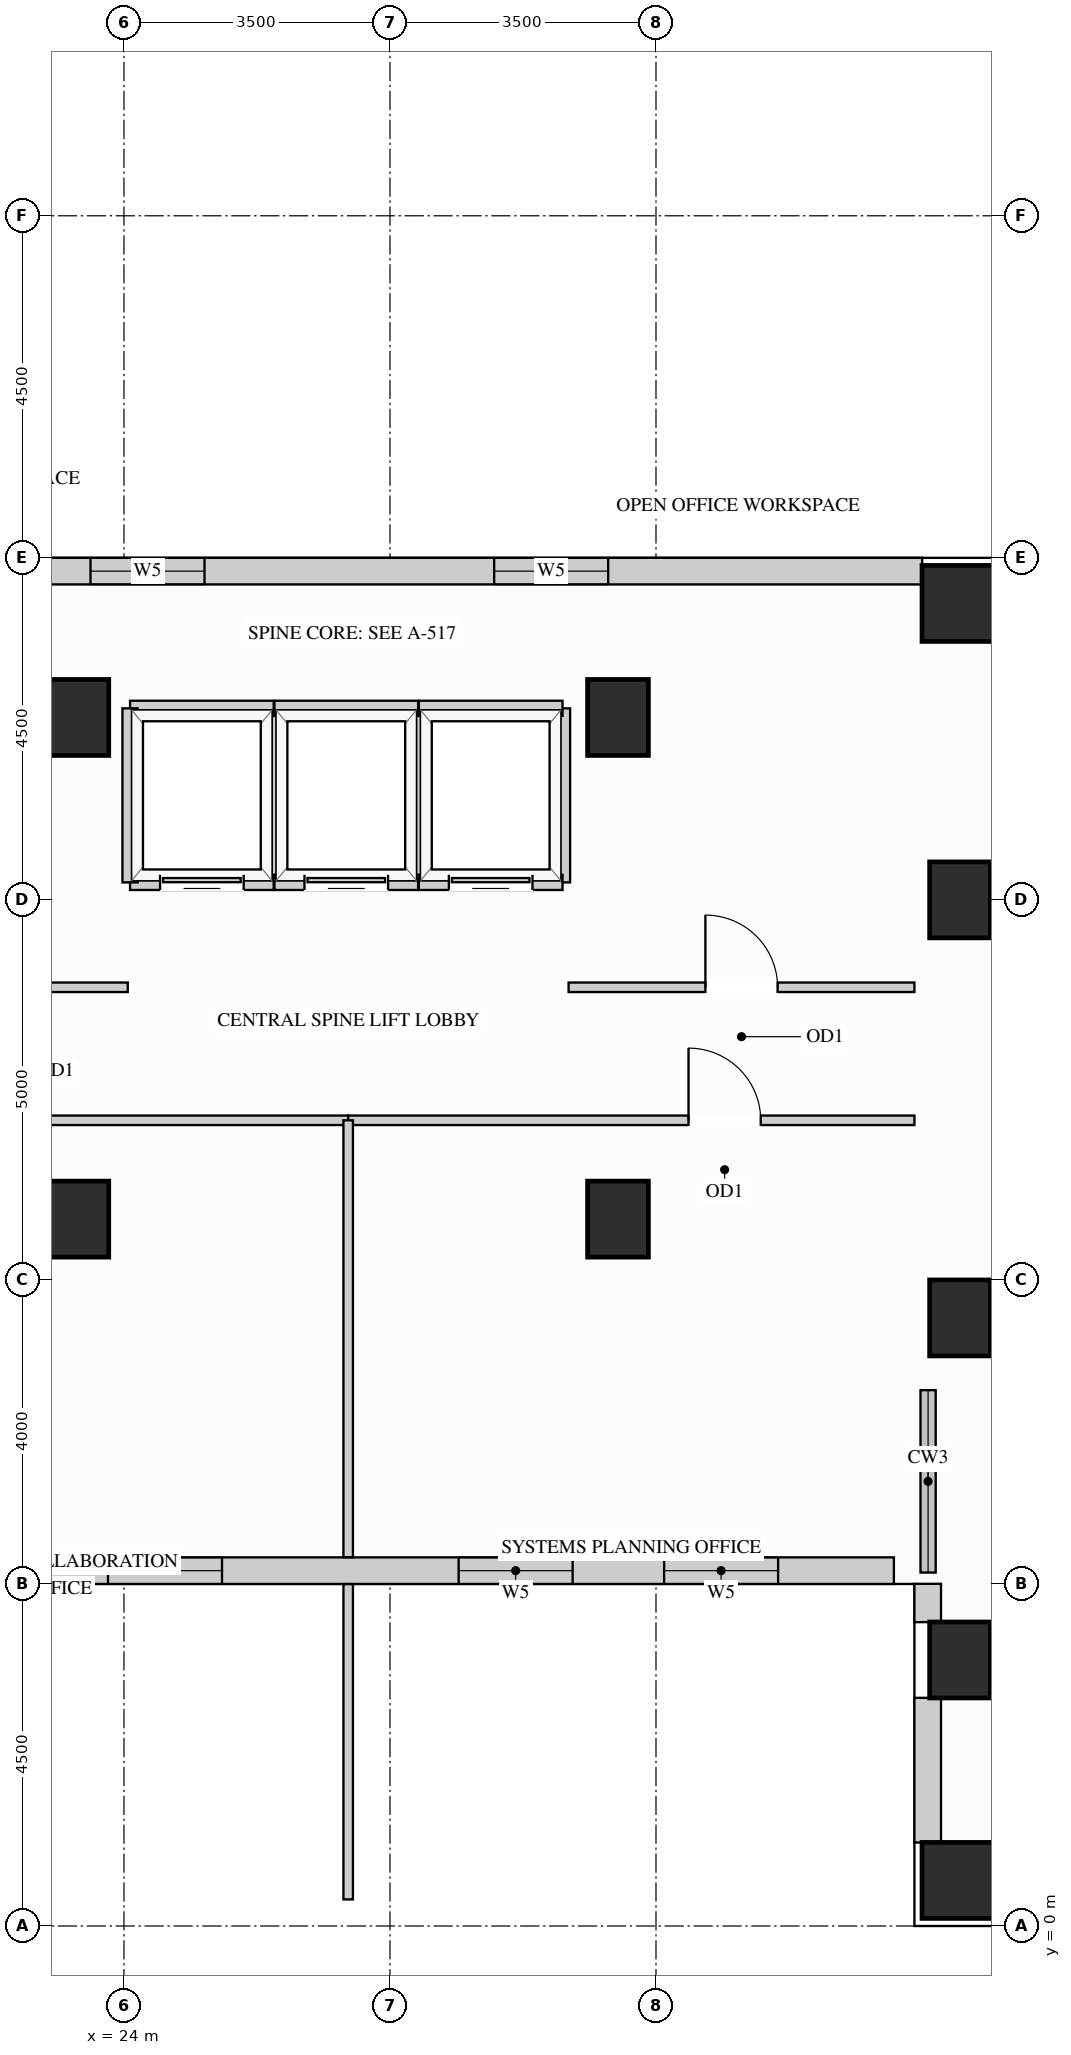
"""IFC4 building model, lengths in metres.
Left out: names, types, materials, properties, quantities, classifications, styles, units other than length and angle.
Written with IfcOpenShell. Run it as: python <this file> out.ifc"""

import sys

from ifc_helpers import new_model, si_unit, direction, frame, frame_2d, origin, origin_2d, place, context, subcontext, project, spatial, rectangle, extrude, source, transform, mapped, element, fill, save


model = new_model("IFC4")
c1 = context("Model", 3, precision=1e-05, world=origin(), true_north=direction((0.0, 1.0)))
c2 = subcontext(c1, "Body", "Model", "MODEL_VIEW")
j1 = project(units=[si_unit("LENGTHUNIT", "METRE"), si_unit("PLANEANGLEUNIT", "RADIAN")], contexts=[c1])
p1 = place(None, origin())
s1 = spatial("IfcSite", under=j1, at=p1, CompositionType="ELEMENT")
p2 = place(p1, origin())
s2 = spatial("IfcBuilding", under=s1, at=p2, CompositionType="ELEMENT")
p3 = place(p2, frame((0.0, 0.0, 146.7)))
s3 = spatial("IfcBuildingStorey", under=s2, at=p3, CompositionType="ELEMENT", Elevation=146.7)
m1 = source(origin(), c2, "Body", "SweptSolid", [
    extrude(rectangle(XDim=0.8, YDim=1.0, at=origin_2d()), origin(), (0.0, 0.0, 1.0), 3.4),
])
for number, where, z_axis, x_axis in (
    (1, (35.0, 13.5, 0.0), (0.0, 0.0, 1.0), (1.0, 0.0, 0.0)),
    (2, (35.0, 3.5, 0.0), (0.0, 0.0, 1.0), (1.0, 0.0, 0.0)),
    (3, (35.0, 8.0, 0.0), (0.0, 0.0, 1.0), (1.0, 0.0, 0.0)),
    (4, (23.4, 15.9, 0.0), (0.0, 0.0, 1.0), (1.0, 0.0, 0.0)),
    (5, (23.4, 9.3, 0.0), (0.0, 0.0, 1.0), (1.0, 0.0, 0.0)),
    (6, (30.5, 15.9, 0.0), (0.0, 0.0, 1.0), (1.0, 0.0, 0.0)),
    (7, (30.5, 9.3, 0.0), (0.0, 0.0, 1.0), (1.0, 0.0, 0.0)),
):
    element("IfcColumn", number, at=place(p3, frame(where, z_axis=z_axis, x_axis=x_axis)), inside=s3, PredefinedType="COLUMN", context=c2, shape_type="MappedRepresentation", body=[
        mapped(m1, transform((0.0, 0.0, 0.0), x_axis=(1.0, 0.0, 0.0), y_axis=(0.0, 1.0, 0.0), z_axis=(0.0, 0.0, 1.0))),
    ])
m2 = source(origin(), c2, "Body", "SweptSolid", [
    extrude(rectangle(XDim=1.0, YDim=1.0, at=origin_2d()), origin(), (0.0, 0.0, 1.0), 3.4),
])
for number, where, z_axis, x_axis in (
    (8, (35.0, 17.4, 0.0), (0.0, 0.0, 1.0), (1.0, 0.0, 0.0)),
    (9, (35.0, 0.6, 0.0), (0.0, 0.0, 1.0), (1.0, 0.0, 0.0)),
):
    element("IfcColumn", number, at=place(p3, frame(where, z_axis=z_axis, x_axis=x_axis)), inside=s3, PredefinedType="COLUMN", context=c2, shape_type="MappedRepresentation", body=[
        mapped(m2, transform((0.0, 0.0, 0.0), x_axis=(1.0, 0.0, 0.0), y_axis=(0.0, 1.0, 0.0), z_axis=(0.0, 0.0, 1.0))),
    ])
p4 = place(p3, frame((19.15, 4.675, 0.0), z_axis=(0.0, 0.0, 1.0), x_axis=(1.0, 0.0, 0.0)))
e10 = element("IfcWall", 10, at=p4, inside=s3, PredefinedType="SOLIDWALL", context=c2, shape_type="SweptSolid", body=[
    extrude(rectangle(XDim=14.98, YDim=0.35, at=frame_2d((7.49, 0.0))), origin(), (0.0, 0.0, 1.0), 3.385),
])
p5 = place(p4, frame((1.73, 0.0, 0.78)))
e11 = element("IfcOpeningElement", 11, at=p5, cuts=e10, PredefinedType="OPENING", context=c2, shape_type="SweptSolid", body=[
    extrude(rectangle(XDim=1.5, YDim=2.0, at=frame_2d((0.75, 1.0))), frame((0.0, 0.185, 0.0), z_axis=(0.0, -1.0, 0.0), x_axis=(1.0, 0.0, 0.0)), (0.0, 0.0, 1.0), 0.37),
])
p6 = place(p4, frame((4.64, 0.0, 0.78)))
e12 = element("IfcOpeningElement", 12, at=p6, cuts=e10, PredefinedType="OPENING", context=c2, shape_type="SweptSolid", body=[
    extrude(rectangle(XDim=1.5, YDim=2.0, at=frame_2d((0.75, 1.0))), frame((0.0, 0.185, 0.0), z_axis=(0.0, -1.0, 0.0), x_axis=(1.0, 0.0, 0.0)), (0.0, 0.0, 1.0), 0.37),
])
p7 = place(p4, frame((9.253, 0.0, 0.78)))
e13 = element("IfcOpeningElement", 13, at=p7, cuts=e10, PredefinedType="OPENING", context=c2, shape_type="SweptSolid", body=[
    extrude(rectangle(XDim=1.5, YDim=2.0, at=frame_2d((0.75, 1.0))), frame((0.0, 0.185, 0.0), z_axis=(0.0, -1.0, 0.0), x_axis=(1.0, 0.0, 0.0)), (0.0, 0.0, 1.0), 0.37),
])
p8 = place(p4, frame((11.957, 0.0, 0.78)))
e14 = element("IfcOpeningElement", 14, at=p8, cuts=e10, PredefinedType="OPENING", context=c2, shape_type="SweptSolid", body=[
    extrude(rectangle(XDim=1.5, YDim=2.0, at=frame_2d((0.75, 1.0))), frame((0.0, 0.185, 0.0), z_axis=(0.0, -1.0, 0.0), x_axis=(1.0, 0.0, 0.0)), (0.0, 0.0, 1.0), 0.37),
])
m3 = source(origin(), c2, "Body", "SweptSolid", [
    extrude(rectangle(XDim=0.504, YDim=0.35, at=frame_2d((0.252, 0.0))), origin(), (0.0, 0.0, 1.0), 3.385),
])
p9 = place(p3, frame((34.575, 4.502, 0.0), z_axis=(0.0, 0.0, 1.0), x_axis=(0.0, -1.0, 0.0)))
e15 = element("IfcWall", 15, at=p9, inside=s3, PredefinedType="SOLIDWALL", context=c2, shape_type="MappedRepresentation", body=[
    mapped(m3, transform((0.0, 0.0, 0.0), x_axis=(1.0, 0.0, 0.0), y_axis=(0.0, 1.0, 0.0), z_axis=(0.0, 0.0, 1.0))),
])
m4 = source(origin(), c2, "Body", "SweptSolid", [
    extrude(rectangle(XDim=1.904, YDim=0.35, at=frame_2d((0.952, 0.0))), origin(), (0.0, 0.0, 1.0), 2.612),
])
p10 = place(p3, frame((34.575, 3.002, 0.0), z_axis=(0.0, 0.0, 1.0), x_axis=(0.0, -1.0, 0.0)))
e16 = element("IfcWall", 16, at=p10, inside=s3, PredefinedType="SOLIDWALL", context=c2, shape_type="MappedRepresentation", body=[
    mapped(m4, transform((0.0, 0.0, 0.0), x_axis=(1.0, 0.0, 0.0), y_axis=(0.0, 1.0, 0.0), z_axis=(0.0, 0.0, 1.0))),
])
p11 = place(p3, frame((34.502, 17.825, 0.0), z_axis=(0.0, 0.0, 1.0), x_axis=(-1.0, 0.0, 0.0)))
e17 = element("IfcWall", 17, at=p11, inside=s3, PredefinedType="SOLIDWALL", context=c2, shape_type="SweptSolid", body=[
    extrude(rectangle(XDim=15.104, YDim=0.35, at=frame_2d((7.552, 0.0))), origin(), (0.0, 0.0, 1.0), 3.385),
])
p12 = place(p11, frame((4.131, 0.0, 0.78)))
e18 = element("IfcOpeningElement", 18, at=p12, cuts=e17, PredefinedType="OPENING", context=c2, shape_type="SweptSolid", body=[
    extrude(rectangle(XDim=1.5, YDim=2.0, at=frame_2d((0.75, 1.0))), frame((0.0, 0.185, 0.0), z_axis=(0.0, -1.0, 0.0), x_axis=(1.0, 0.0, 0.0)), (0.0, 0.0, 1.0), 0.37),
])
p13 = place(p11, frame((9.442, 0.0, 0.78)))
e19 = element("IfcOpeningElement", 19, at=p13, cuts=e17, PredefinedType="OPENING", context=c2, shape_type="SweptSolid", body=[
    extrude(rectangle(XDim=1.5, YDim=2.0, at=frame_2d((0.75, 1.0))), frame((0.0, 0.185, 0.0), z_axis=(0.0, -1.0, 0.0), x_axis=(1.0, 0.0, 0.0)), (0.0, 0.0, 1.0), 0.37),
])
p14 = place(p3, frame((29.85, 12.35, 0.0), z_axis=(0.0, 0.0, 1.0), x_axis=(1.0, 0.0, 0.0)))
e20 = element("IfcWall", 20, at=p14, inside=s3, PredefinedType="PARTITIONING", context=c2, shape_type="SweptSolid", body=[
    extrude(rectangle(XDim=4.55, YDim=0.125, at=frame_2d((2.275, 0.0))), origin(), (0.0, 0.0, 1.0), 3.385),
])
p15 = place(p14, frame((1.8, 0.0, 0.0)))
e21 = element("IfcOpeningElement", 21, at=p15, cuts=e20, PredefinedType="OPENING", context=c2, shape_type="SweptSolid", body=[
    extrude(rectangle(XDim=0.95, YDim=2.15, at=frame_2d((0.475, 1.075))), frame((0.0, 0.073, 0.0), z_axis=(0.0, -1.0, 0.0), x_axis=(1.0, 0.0, 0.0)), (0.0, 0.0, 1.0), 0.145),
])
p16 = place(p3, frame((19.5, 12.35, 0.0), z_axis=(0.0, 0.0, 1.0), x_axis=(1.0, 0.0, 0.0)))
e22 = element("IfcWall", 22, at=p16, inside=s3, PredefinedType="PARTITIONING", context=c2, shape_type="SweptSolid", body=[
    extrude(rectangle(XDim=4.55, YDim=0.125, at=frame_2d((2.275, 0.0))), origin(), (0.0, 0.0, 1.0), 3.385),
])
p17 = place(p16, frame((1.8, 0.0, 0.0)))
e23 = element("IfcOpeningElement", 23, at=p17, cuts=e22, PredefinedType="OPENING", context=c2, shape_type="SweptSolid", body=[
    extrude(rectangle(XDim=0.95, YDim=2.15, at=frame_2d((0.475, 1.075))), frame((0.0, 0.073, 0.0), z_axis=(0.0, -1.0, 0.0), x_axis=(1.0, 0.0, 0.0)), (0.0, 0.0, 1.0), 0.145),
])
p18 = place(p3, frame((19.5, 10.6, 0.0), z_axis=(0.0, 0.0, 1.0), x_axis=(1.0, 0.0, 0.0)))
e24 = element("IfcWall", 24, at=p18, inside=s3, PredefinedType="PARTITIONING", context=c2, shape_type="SweptSolid", body=[
    extrude(rectangle(XDim=7.45, YDim=0.125, at=frame_2d((3.725, 0.0))), origin(), (0.0, 0.0, 1.0), 3.385),
])
p19 = place(p18, frame((2.022, 0.0, 0.0)))
e25 = element("IfcOpeningElement", 25, at=p19, cuts=e24, PredefinedType="OPENING", context=c2, shape_type="SweptSolid", body=[
    extrude(rectangle(XDim=0.95, YDim=2.15, at=frame_2d((0.475, 1.075))), frame((0.0, 0.073, 0.0), z_axis=(0.0, -1.0, 0.0), x_axis=(1.0, 0.0, 0.0)), (0.0, 0.0, 1.0), 0.145),
])
p20 = place(p3, frame((26.95, 10.6, 0.0), z_axis=(0.0, 0.0, 1.0), x_axis=(1.0, 0.0, 0.0)))
e26 = element("IfcWall", 26, at=p20, inside=s3, PredefinedType="PARTITIONING", context=c2, shape_type="SweptSolid", body=[
    extrude(rectangle(XDim=7.45, YDim=0.125, at=frame_2d((3.725, 0.0))), origin(), (0.0, 0.0, 1.0), 3.385),
])
p21 = place(p20, frame((4.478, 0.0, 0.0)))
e27 = element("IfcOpeningElement", 27, at=p21, cuts=e26, PredefinedType="OPENING", context=c2, shape_type="SweptSolid", body=[
    extrude(rectangle(XDim=0.95, YDim=2.15, at=frame_2d((0.475, 1.075))), frame((0.0, 0.073, 0.0), z_axis=(0.0, -1.0, 0.0), x_axis=(1.0, 0.0, 0.0)), (0.0, 0.0, 1.0), 0.145),
])
m5 = source(origin(), c2, "Body", "SweptSolid", [
    extrude(rectangle(XDim=4.148, YDim=0.125, at=frame_2d((2.074, 0.0))), origin(), (0.0, 0.0, 1.0), 3.385),
])
p22 = place(p3, frame((26.95, 0.35, 0.0), z_axis=(0.0, 0.0, 1.0), x_axis=(0.0, 1.0, 0.0)))
e28 = element("IfcWall", 28, at=p22, inside=s3, PredefinedType="PARTITIONING", context=c2, shape_type="MappedRepresentation", body=[
    mapped(m5, transform((0.0, 0.0, 0.0), x_axis=(1.0, 0.0, 0.0), y_axis=(0.0, 1.0, 0.0), z_axis=(0.0, 0.0, 1.0))),
])
m6 = source(origin(), c2, "Body", "SweptSolid", [
    extrude(rectangle(XDim=5.748, YDim=0.125, at=frame_2d((2.874, 0.0))), origin(), (0.0, 0.0, 1.0), 3.385),
])
p23 = place(p3, frame((26.95, 4.852, 0.0), z_axis=(0.0, 0.0, 1.0), x_axis=(0.0, 1.0, 0.0)))
e29 = element("IfcWall", 29, at=p23, inside=s3, PredefinedType="PARTITIONING", context=c2, shape_type="MappedRepresentation", body=[
    mapped(m6, transform((0.0, 0.0, 0.0), x_axis=(1.0, 0.0, 0.0), y_axis=(0.0, 1.0, 0.0), z_axis=(0.0, 0.0, 1.0))),
])
m7 = source(origin(), c2, "Body", "SweptSolid", [
    extrude(rectangle(XDim=2.29, YDim=0.2, at=frame_2d((1.145, 0.0))), origin(), (0.0, 0.0, 1.0), 3.385),
])
p24 = place(p3, frame((25.97, 13.73, 0.0), z_axis=(0.0, 0.0, 1.0), x_axis=(0.0, 1.0, 0.0)))
e30 = element("IfcWall", 30, at=p24, inside=s3, PredefinedType="PARTITIONING", context=c2, shape_type="MappedRepresentation", body=[
    mapped(m7, transform((0.0, 0.0, 0.0), x_axis=(1.0, 0.0, 0.0), y_axis=(0.0, 1.0, 0.0), z_axis=(0.0, 0.0, 1.0))),
])
m8 = source(origin(), c2, "Body", "SweptSolid", [
    extrude(rectangle(XDim=1.89, YDim=0.2, at=frame_2d((0.945, 0.0))), origin(), (0.0, 0.0, 1.0), 2.773),
])
p25 = place(p3, frame((24.08, 16.02, 0.0), z_axis=(0.0, 0.0, 1.0), x_axis=(1.0, 0.0, 0.0)))
e31 = element("IfcWall", 31, at=p25, inside=s3, PredefinedType="PARTITIONING", context=c2, shape_type="MappedRepresentation", body=[
    mapped(m8, transform((0.0, 0.0, 0.0), x_axis=(1.0, 0.0, 0.0), y_axis=(0.0, 1.0, 0.0), z_axis=(0.0, 0.0, 1.0))),
])
p26 = place(p3, frame((24.08, 13.73, 0.0), z_axis=(0.0, 0.0, 1.0), x_axis=(1.0, 0.0, 0.0)))
e32 = element("IfcWall", 32, at=p26, inside=s3, PredefinedType="PARTITIONING", context=c2, shape_type="SweptSolid", body=[
    extrude(rectangle(XDim=1.89, YDim=0.2, at=frame_2d((0.945, 0.0))), origin(), (0.0, 0.0, 1.0), 2.466),
])
p27 = place(p26, frame((0.395, 0.0, 0.0)))
e33 = element("IfcOpeningElement", 33, at=p27, cuts=e32, PredefinedType="OPENING", context=c2, shape_type="SweptSolid", body=[
    extrude(rectangle(XDim=1.1, YDim=2.2, at=frame_2d((0.55, 1.1))), frame((0.0, 0.11, 0.0), z_axis=(0.0, -1.0, 0.0), x_axis=(1.0, 0.0, 0.0)), (0.0, 0.0, 1.0), 0.22),
])
for number, where, z_axis, x_axis in (
    (34, (24.08, 13.73, 0.0), (0.0, 0.0, 1.0), (0.0, 1.0, 0.0)),
    (35, (27.87, 13.73, 0.0), (0.0, 0.0, 1.0), (0.0, 1.0, 0.0)),
):
    element("IfcWall", number, at=place(p3, frame(where, z_axis=z_axis, x_axis=x_axis)), inside=s3, PredefinedType="PARTITIONING", context=c2, shape_type="MappedRepresentation", body=[
        mapped(m7, transform((0.0, 0.0, 0.0), x_axis=(1.0, 0.0, 0.0), y_axis=(0.0, 1.0, 0.0), z_axis=(0.0, 0.0, 1.0))),
    ])
m9 = source(origin(), c2, "Body", "SweptSolid", [
    extrude(rectangle(XDim=1.89, YDim=0.2, at=frame_2d((0.945, 0.0))), origin(), (0.0, 0.0, 1.0), 2.773),
])
p28 = place(p3, frame((25.98, 16.02, 0.0), z_axis=(0.0, 0.0, 1.0), x_axis=(1.0, 0.0, 0.0)))
e36 = element("IfcWall", 36, at=p28, inside=s3, PredefinedType="PARTITIONING", context=c2, shape_type="MappedRepresentation", body=[
    mapped(m9, transform((0.0, 0.0, 0.0), x_axis=(1.0, 0.0, 0.0), y_axis=(0.0, 1.0, 0.0), z_axis=(0.0, 0.0, 1.0))),
])
p29 = place(p3, frame((25.98, 13.73, 0.0), z_axis=(0.0, 0.0, 1.0), x_axis=(1.0, 0.0, 0.0)))
e37 = element("IfcWall", 37, at=p29, inside=s3, PredefinedType="PARTITIONING", context=c2, shape_type="SweptSolid", body=[
    extrude(rectangle(XDim=1.89, YDim=0.2, at=frame_2d((0.945, 0.0))), origin(), (0.0, 0.0, 1.0), 2.466),
])
p30 = place(p29, frame((0.395, 0.0, 0.0)))
e38 = element("IfcOpeningElement", 38, at=p30, cuts=e37, PredefinedType="OPENING", context=c2, shape_type="SweptSolid", body=[
    extrude(rectangle(XDim=1.1, YDim=2.2, at=frame_2d((0.55, 1.1))), frame((0.0, 0.11, 0.0), z_axis=(0.0, -1.0, 0.0), x_axis=(1.0, 0.0, 0.0)), (0.0, 0.0, 1.0), 0.22),
])
p31 = place(p3, frame((29.77, 13.73, 0.0), z_axis=(0.0, 0.0, 1.0), x_axis=(0.0, 1.0, 0.0)))
e39 = element("IfcWall", 39, at=p31, inside=s3, PredefinedType="PARTITIONING", context=c2, shape_type="MappedRepresentation", body=[
    mapped(m7, transform((0.0, 0.0, 0.0), x_axis=(1.0, 0.0, 0.0), y_axis=(0.0, 1.0, 0.0), z_axis=(0.0, 0.0, 1.0))),
])
p32 = place(p3, frame((27.88, 16.02, 0.0), z_axis=(0.0, 0.0, 1.0), x_axis=(1.0, 0.0, 0.0)))
e40 = element("IfcWall", 40, at=p32, inside=s3, PredefinedType="PARTITIONING", context=c2, shape_type="MappedRepresentation", body=[
    mapped(m9, transform((0.0, 0.0, 0.0), x_axis=(1.0, 0.0, 0.0), y_axis=(0.0, 1.0, 0.0), z_axis=(0.0, 0.0, 1.0))),
])
p33 = place(p3, frame((27.88, 13.73, 0.0), z_axis=(0.0, 0.0, 1.0), x_axis=(1.0, 0.0, 0.0)))
e41 = element("IfcWall", 41, at=p33, inside=s3, PredefinedType="PARTITIONING", context=c2, shape_type="SweptSolid", body=[
    extrude(rectangle(XDim=1.89, YDim=0.2, at=frame_2d((0.945, 0.0))), origin(), (0.0, 0.0, 1.0), 2.466),
])
p34 = place(p33, frame((0.395, 0.0, 0.0)))
e42 = element("IfcOpeningElement", 42, at=p34, cuts=e41, PredefinedType="OPENING", context=c2, shape_type="SweptSolid", body=[
    extrude(rectangle(XDim=1.1, YDim=2.2, at=frame_2d((0.55, 1.1))), frame((0.0, 0.11, 0.0), z_axis=(0.0, -1.0, 0.0), x_axis=(1.0, 0.0, 0.0)), (0.0, 0.0, 1.0), 0.22),
])
m10 = source(origin(), c2, "Body", "SweptSolid", [
    extrude(rectangle(XDim=1.1, YDim=2.2, at=frame_2d((0.55, 1.1))), frame((0.0, 0.025, 0.0), z_axis=(0.0, -1.0, 0.0), x_axis=(1.0, 0.0, 0.0)), (0.0, 0.0, 1.0), 0.05),
])
p35 = place(p27, origin())
e43 = element("IfcDoor", 43, at=p35, inside=s3, OperationType="SLIDING_TO_LEFT", PredefinedType="DOOR", context=c2, shape_type="MappedRepresentation", body=[
    mapped(m10, transform((0.0, 0.0, 0.0), x_axis=(1.0, 0.0, 0.0), y_axis=(0.0, 1.0, 0.0), z_axis=(0.0, 0.0, 1.0))),
])
fill(e33, e43)
p36 = place(p30, origin())
e44 = element("IfcDoor", 44, at=p36, inside=s3, OperationType="SLIDING_TO_LEFT", PredefinedType="DOOR", context=c2, shape_type="MappedRepresentation", body=[
    mapped(m10, transform((0.0, 0.0, 0.0), x_axis=(1.0, 0.0, 0.0), y_axis=(0.0, 1.0, 0.0), z_axis=(0.0, 0.0, 1.0))),
])
fill(e38, e44)
p37 = place(p34, origin())
e45 = element("IfcDoor", 45, at=p37, inside=s3, OperationType="SLIDING_TO_LEFT", PredefinedType="DOOR", context=c2, shape_type="MappedRepresentation", body=[
    mapped(m10, transform((0.0, 0.0, 0.0), x_axis=(1.0, 0.0, 0.0), y_axis=(0.0, 1.0, 0.0), z_axis=(0.0, 0.0, 1.0))),
])
fill(e42, e45)
m11 = source(origin(), c2, "Body", "SweptSolid", [
    extrude(rectangle(XDim=0.95, YDim=2.15, at=frame_2d((0.475, 1.075))), frame((0.0, 0.025, 0.0), z_axis=(0.0, -1.0, 0.0), x_axis=(1.0, 0.0, 0.0)), (0.0, 0.0, 1.0), 0.05),
])
p38 = place(p15, origin())
e46 = element("IfcDoor", 46, at=p38, inside=s3, OperationType="SINGLE_SWING_LEFT", PredefinedType="DOOR", context=c2, shape_type="MappedRepresentation", body=[
    mapped(m11, transform((0.0, 0.0, 0.0), x_axis=(1.0, 0.0, 0.0), y_axis=(0.0, 1.0, 0.0), z_axis=(0.0, 0.0, 1.0))),
])
fill(e21, e46)
p39 = place(p21, origin())
e47 = element("IfcDoor", 47, at=p39, inside=s3, OperationType="SINGLE_SWING_LEFT", PredefinedType="DOOR", context=c2, shape_type="MappedRepresentation", body=[
    mapped(m11, transform((0.0, 0.0, 0.0), x_axis=(1.0, 0.0, 0.0), y_axis=(0.0, 1.0, 0.0), z_axis=(0.0, 0.0, 1.0))),
])
fill(e27, e47)
m12 = source(origin(), c2, "Body", "SweptSolid", [
    extrude(rectangle(XDim=1.5, YDim=2.0, at=frame_2d((0.75, 1.0))), frame((0.0, 0.03, 0.0), z_axis=(0.0, -1.0, 0.0), x_axis=(1.0, 0.0, 0.0)), (0.0, 0.0, 1.0), 0.06),
])
p40 = place(p6, origin())
e48 = element("IfcWindow", 48, at=p40, inside=s3, PartitioningType="SINGLE_PANEL", PredefinedType="WINDOW", context=c2, shape_type="MappedRepresentation", body=[
    mapped(m12, transform((0.0, 0.0, 0.0), x_axis=(1.0, 0.0, 0.0), y_axis=(0.0, 1.0, 0.0), z_axis=(0.0, 0.0, 1.0))),
])
fill(e12, e48)
p41 = place(p7, origin())
e49 = element("IfcWindow", 49, at=p41, inside=s3, PartitioningType="SINGLE_PANEL", PredefinedType="WINDOW", context=c2, shape_type="MappedRepresentation", body=[
    mapped(m12, transform((0.0, 0.0, 0.0), x_axis=(1.0, 0.0, 0.0), y_axis=(0.0, 1.0, 0.0), z_axis=(0.0, 0.0, 1.0))),
])
fill(e13, e49)
p42 = place(p8, origin())
e50 = element("IfcWindow", 50, at=p42, inside=s3, PartitioningType="SINGLE_PANEL", PredefinedType="WINDOW", context=c2, shape_type="MappedRepresentation", body=[
    mapped(m12, transform((0.0, 0.0, 0.0), x_axis=(1.0, 0.0, 0.0), y_axis=(0.0, 1.0, 0.0), z_axis=(0.0, 0.0, 1.0))),
])
fill(e14, e50)
p43 = place(p12, origin())
e51 = element("IfcWindow", 51, at=p43, inside=s3, PartitioningType="SINGLE_PANEL", PredefinedType="WINDOW", context=c2, shape_type="MappedRepresentation", body=[
    mapped(m12, transform((0.0, 0.0, 0.0), x_axis=(1.0, 0.0, 0.0), y_axis=(0.0, 1.0, 0.0), z_axis=(0.0, 0.0, 1.0))),
])
fill(e18, e51)
p44 = place(p13, origin())
e52 = element("IfcWindow", 52, at=p44, inside=s3, PartitioningType="SINGLE_PANEL", PredefinedType="WINDOW", context=c2, shape_type="MappedRepresentation", body=[
    mapped(m12, transform((0.0, 0.0, 0.0), x_axis=(1.0, 0.0, 0.0), y_axis=(0.0, 1.0, 0.0), z_axis=(0.0, 0.0, 1.0))),
])
fill(e19, e52)
save(model, sys.argv[1])
